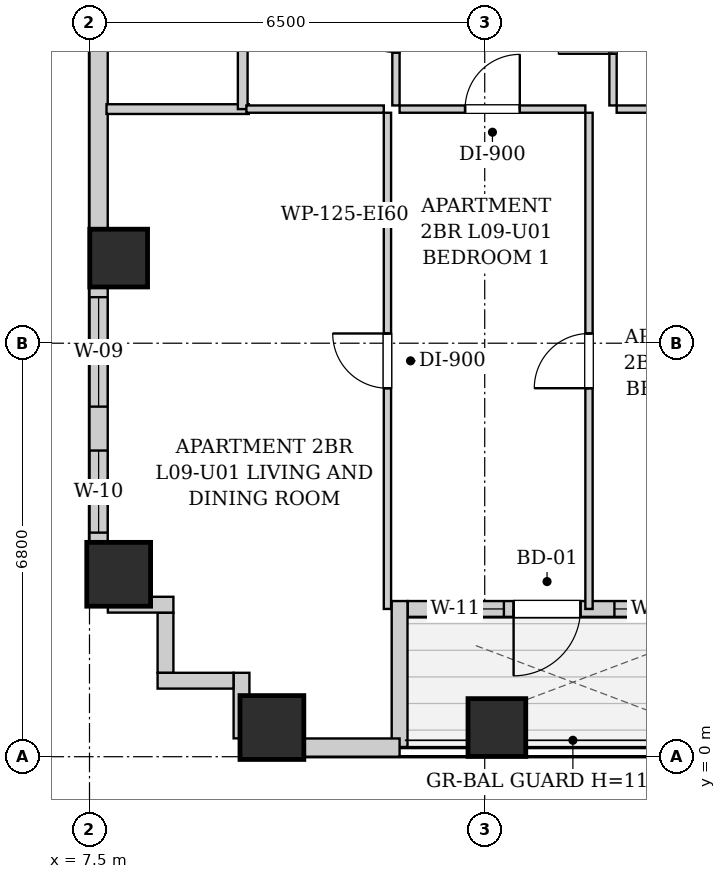
"""IFC4 building model, lengths in metres.
Left out: names, types, materials, properties, quantities, classifications, styles, units other than length and angle.
Written with IfcOpenShell. Run it as: python <this file> out.ifc"""

import sys

from ifc_helpers import new_model, si_unit, direction, frame, frame_2d, origin, origin_2d, place, context, subcontext, project, spatial, rectangle, extrude, element, fill, save


model = new_model("IFC4")
c1 = context("Model", 3, precision=1e-05, world=origin(), true_north=direction((0.0, 1.0)))
c2 = subcontext(c1, "Body", "Model", "MODEL_VIEW")
j1 = project(units=[si_unit("LENGTHUNIT", "METRE"), si_unit("PLANEANGLEUNIT", "RADIAN")], contexts=[c1])
p1 = place(None, origin())
s1 = spatial("IfcSite", under=j1, at=p1, CompositionType="ELEMENT")
p2 = place(p1, origin())
s2 = spatial("IfcBuilding", under=s1, at=p2, CompositionType="ELEMENT")
p3 = place(p2, frame((0.0, 0.0, 38.6)))
s3 = spatial("IfcBuildingStorey", under=s2, at=p3, CompositionType="ELEMENT", Elevation=38.6)
p4 = place(p3, frame((10.5, 0.48, 0.0), z_axis=(0.0, 0.0, 1.0), x_axis=(1.0, 0.0, 0.0)))
e1 = element("IfcColumn", 1, at=p4, inside=s3, PredefinedType="COLUMN", context=c2, shape_type="SweptSolid", body=[
    extrude(rectangle(XDim=1.05, YDim=1.05, at=origin_2d()), origin(), (0.0, 0.0, 1.0), 3.2),
])
p5 = place(p3, frame((14.2, 0.48, 0.0), z_axis=(0.0, 0.0, 1.0), x_axis=(1.0, 0.0, 0.0)))
e2 = element("IfcColumn", 2, at=p5, inside=s3, PredefinedType="COLUMN", context=c2, shape_type="SweptSolid", body=[
    extrude(rectangle(XDim=0.95, YDim=0.95, at=origin_2d()), origin(), (0.0, 0.0, 1.0), 3.2),
])
p6 = place(p3, frame((7.98, 3.0, 0.0), z_axis=(0.0, 0.0, 1.0), x_axis=(1.0, 0.0, 0.0)))
e3 = element("IfcColumn", 3, at=p6, inside=s3, PredefinedType="COLUMN", context=c2, shape_type="SweptSolid", body=[
    extrude(rectangle(XDim=1.05, YDim=1.05, at=origin_2d()), origin(), (0.0, 0.0, 1.0), 3.2),
])
p7 = place(p3, frame((7.98, 8.2, 0.0), z_axis=(0.0, 0.0, 1.0), x_axis=(1.0, 0.0, 0.0)))
e4 = element("IfcColumn", 4, at=p7, inside=s3, PredefinedType="COLUMN", context=c2, shape_type="SweptSolid", body=[
    extrude(rectangle(XDim=0.95, YDim=0.95, at=origin_2d()), origin(), (0.0, 0.0, 1.0), 3.2),
])
p8 = place(p3, frame((18.166, 2.43, 0.0), z_axis=(0.0, 0.0, 1.0), x_axis=(-1.0, 0.0, 0.0)))
e5 = element("IfcWall", 5, at=p8, inside=s3, PredefinedType="SOLIDWALL", context=c2, shape_type="SweptSolid", body=[
    extrude(rectangle(XDim=5.432, YDim=0.26, at=frame_2d((2.716, 0.0))), origin(), (0.0, 0.0, 1.0), 2.94),
])
p9 = place(p8, frame((2.591, 0.0, 0.0)))
e6 = element("IfcOpeningElement", 6, at=p9, cuts=e5, PredefinedType="OPENING", context=c2, shape_type="SweptSolid", body=[
    extrude(rectangle(XDim=1.1, YDim=2.0, at=frame_2d((0.55, 1.0))), frame((0.0, 0.14, 0.0), z_axis=(0.0, -1.0, 0.0), x_axis=(1.0, 0.0, 0.0)), (0.0, 0.0, 1.0), 0.28),
])
p10 = place(p8, frame((3.851, 0.0, 0.55)))
e7 = element("IfcOpeningElement", 7, at=p10, cuts=e5, PredefinedType="OPENING", context=c2, shape_type="SweptSolid", body=[
    extrude(rectangle(XDim=0.85, YDim=1.2, at=frame_2d((0.425, 0.6))), frame((0.0, 0.14, 0.0), z_axis=(0.0, -1.0, 0.0), x_axis=(1.0, 0.0, 0.0)), (0.0, 0.0, 1.0), 0.28),
])
p11 = place(p8, frame((0.683, 0.0, 0.85)))
e8 = element("IfcOpeningElement", 8, at=p11, cuts=e5, PredefinedType="OPENING", context=c2, shape_type="SweptSolid", body=[
    extrude(rectangle(XDim=1.35, YDim=1.65, at=frame_2d((0.675, 0.825))), frame((0.0, 0.14, 0.0), z_axis=(0.0, -1.0, 0.0), x_axis=(1.0, 0.0, 0.0)), (0.0, 0.0, 1.0), 0.28),
])
p12 = place(p3, frame((12.6, 2.56, 0.0), z_axis=(0.0, 0.0, 1.0), x_axis=(0.0, -1.0, 0.0)))
e9 = element("IfcWall", 9, at=p12, inside=s3, PredefinedType="SOLIDWALL", context=c2, shape_type="SweptSolid", body=[
    extrude(rectangle(XDim=2.4, YDim=0.26, at=frame_2d((1.2, 0.0))), origin(), (0.0, 0.0, 1.0), 2.94),
])
p13 = place(p3, frame((12.6, 0.15, 0.0), z_axis=(0.0, 0.0, 1.0), x_axis=(-1.0, 0.0, 0.0)))
e10 = element("IfcWall", 10, at=p13, inside=s3, PredefinedType="SOLIDWALL", context=c2, shape_type="SweptSolid", body=[
    extrude(rectangle(XDim=2.6, YDim=0.3, at=frame_2d((1.3, 0.0))), origin(), (0.0, 0.0, 1.0), 1.975),
])
p14 = place(p3, frame((7.65, 2.5, 0.0), z_axis=(0.0, 0.0, 1.0), x_axis=(0.0, 1.0, 0.0)))
e11 = element("IfcWall", 11, at=p14, inside=s3, PredefinedType="SOLIDWALL", context=c2, shape_type="SweptSolid", body=[
    extrude(rectangle(XDim=12.7, YDim=0.3, at=frame_2d((6.35, 0.0))), origin(), (0.0, 0.0, 1.0), 1.975),
])
p15 = place(p14, frame((3.257, 0.0, 0.55)))
e12 = element("IfcOpeningElement", 12, at=p15, cuts=e11, PredefinedType="OPENING", context=c2, shape_type="SweptSolid", body=[
    extrude(rectangle(XDim=1.8, YDim=1.2, at=frame_2d((0.9, 0.6))), frame((0.0, 0.16, 0.0), z_axis=(0.0, -1.0, 0.0), x_axis=(1.0, 0.0, 0.0)), (0.0, 0.0, 1.0), 0.32),
])
p16 = place(p14, frame((1.185, 0.0, 0.55)))
e13 = element("IfcOpeningElement", 13, at=p16, cuts=e11, PredefinedType="OPENING", context=c2, shape_type="SweptSolid", body=[
    extrude(rectangle(XDim=1.35, YDim=1.2, at=frame_2d((0.675, 0.6))), frame((0.0, 0.16, 0.0), z_axis=(0.0, -1.0, 0.0), x_axis=(1.0, 0.0, 0.0)), (0.0, 0.0, 1.0), 0.32),
])
p17 = place(p3, frame((10.0, 0.302, 0.0), z_axis=(0.0, 0.0, 1.0), x_axis=(0.0, 1.0, 0.0)))
e14 = element("IfcWall", 14, at=p17, inside=s3, PredefinedType="SOLIDWALL", context=c2, shape_type="SweptSolid", body=[
    extrude(rectangle(XDim=1.078, YDim=0.26, at=frame_2d((0.539, 0.0))), origin(), (0.0, 0.0, 1.0), 2.94),
])
p18 = place(p3, frame((9.868, 1.25, 0.0), z_axis=(0.0, 0.0, 1.0), x_axis=(-1.0, 0.0, 0.0)))
e15 = element("IfcWall", 15, at=p18, inside=s3, PredefinedType="SOLIDWALL", context=c2, shape_type="SweptSolid", body=[
    extrude(rectangle(XDim=1.248, YDim=0.26, at=frame_2d((0.624, 0.0))), origin(), (0.0, 0.0, 1.0), 2.94),
])
p19 = place(p3, frame((8.75, 1.382, 0.0), z_axis=(0.0, 0.0, 1.0), x_axis=(0.0, 1.0, 0.0)))
e16 = element("IfcWall", 16, at=p19, inside=s3, PredefinedType="SOLIDWALL", context=c2, shape_type="SweptSolid", body=[
    extrude(rectangle(XDim=0.986, YDim=0.26, at=frame_2d((0.493, 0.0))), origin(), (0.0, 0.0, 1.0), 2.94),
])
p20 = place(p3, frame((8.88, 2.5, 0.0), z_axis=(0.0, 0.0, 1.0), x_axis=(-1.0, 0.0, 0.0)))
e17 = element("IfcWall", 17, at=p20, inside=s3, PredefinedType="SOLIDWALL", context=c2, shape_type="SweptSolid", body=[
    extrude(rectangle(XDim=1.078, YDim=0.26, at=frame_2d((0.539, 0.0))), origin(), (0.0, 0.0, 1.0), 2.94),
])
p21 = place(p3, frame((7.78, 10.65, 0.0), z_axis=(0.0, 0.0, 1.0), x_axis=(1.0, 0.0, 0.0)))
e18 = element("IfcWall", 18, at=p21, inside=s3, PredefinedType="PARTITIONING", context=c2, shape_type="SweptSolid", body=[
    extrude(rectangle(XDim=2.34, YDim=0.16, at=frame_2d((1.17, 0.0))), origin(), (0.0, 0.0, 1.0), 2.94),
])
p22 = place(p3, frame((10.02, 10.65, 0.0), z_axis=(0.0, 0.0, 1.0), x_axis=(0.0, 1.0, 0.0)))
e19 = element("IfcWall", 19, at=p22, inside=s3, PredefinedType="PARTITIONING", context=c2, shape_type="SweptSolid", body=[
    extrude(rectangle(XDim=2.66, YDim=0.16, at=frame_2d((1.33, 0.0))), origin(), (0.0, 0.0, 1.0), 2.94),
])
p23 = place(p3, frame((12.54, 10.71, 0.0), z_axis=(0.0, 0.0, 1.0), x_axis=(0.0, 1.0, 0.0)))
e20 = element("IfcWall", 20, at=p23, inside=s3, PredefinedType="PARTITIONING", context=c2, shape_type="SweptSolid", body=[
    extrude(rectangle(XDim=2.6, YDim=0.12, at=frame_2d((1.3, 0.0))), origin(), (0.0, 0.0, 1.0), 2.94),
])
p24 = place(p23, frame((0.87, 0.0, 0.0)))
e21 = element("IfcOpeningElement", 21, at=p24, cuts=e20, PredefinedType="OPENING", context=c2, shape_type="SweptSolid", body=[
    extrude(rectangle(XDim=0.86, YDim=2.05, at=frame_2d((0.43, 1.025))), frame((0.0, 0.07, 0.0), z_axis=(0.0, -1.0, 0.0), x_axis=(1.0, 0.0, 0.0)), (0.0, 0.0, 1.0), 0.14),
])
p25 = place(p3, frame((10.08, 10.65, 0.0), z_axis=(0.0, 0.0, 1.0), x_axis=(1.0, 0.0, 0.0)))
e22 = element("IfcWall", 22, at=p25, inside=s3, PredefinedType="PARTITIONING", context=c2, shape_type="SweptSolid", body=[
    extrude(rectangle(XDim=2.26, YDim=0.12, at=frame_2d((1.13, 0.0))), origin(), (0.0, 0.0, 1.0), 2.94),
])
p26 = place(p3, frame((16.11, 10.71, 0.0), z_axis=(0.0, 0.0, 1.0), x_axis=(0.0, 1.0, 0.0)))
e23 = element("IfcWall", 23, at=p26, inside=s3, PredefinedType="PARTITIONING", context=c2, shape_type="SweptSolid", body=[
    extrude(rectangle(XDim=2.6, YDim=0.12, at=frame_2d((1.3, 0.0))), origin(), (0.0, 0.0, 1.0), 2.94),
])
p27 = place(p26, frame((0.85, 0.0, 0.0)))
e24 = element("IfcOpeningElement", 24, at=p27, cuts=e23, PredefinedType="OPENING", context=c2, shape_type="SweptSolid", body=[
    extrude(rectangle(XDim=0.9, YDim=2.05, at=frame_2d((0.45, 1.025))), frame((0.0, 0.07, 0.0), z_axis=(0.0, -1.0, 0.0), x_axis=(1.0, 0.0, 0.0)), (0.0, 0.0, 1.0), 0.14),
])
p28 = place(p3, frame((12.6, 10.65, 0.0), z_axis=(0.0, 0.0, 1.0), x_axis=(1.0, 0.0, 0.0)))
e25 = element("IfcWall", 25, at=p28, inside=s3, PredefinedType="PARTITIONING", context=c2, shape_type="SweptSolid", body=[
    extrude(rectangle(XDim=3.055, YDim=0.12, at=frame_2d((1.527, 0.0))), origin(), (0.0, 0.0, 1.0), 2.94),
])
p29 = place(p28, frame((1.077, 0.0, 0.0)))
e26 = element("IfcOpeningElement", 26, at=p29, cuts=e25, PredefinedType="OPENING", context=c2, shape_type="SweptSolid", body=[
    extrude(rectangle(XDim=0.9, YDim=2.05, at=frame_2d((0.45, 1.025))), frame((0.0, 0.07, 0.0), z_axis=(0.0, -1.0, 0.0), x_axis=(1.0, 0.0, 0.0)), (0.0, 0.0, 1.0), 0.14),
])
p30 = place(p3, frame((16.17, 10.65, 0.0), z_axis=(0.0, 0.0, 1.0), x_axis=(1.0, 0.0, 0.0)))
e27 = element("IfcWall", 27, at=p30, inside=s3, PredefinedType="PARTITIONING", context=c2, shape_type="SweptSolid", body=[
    extrude(rectangle(XDim=2.8, YDim=0.12, at=frame_2d((1.4, 0.0))), origin(), (0.0, 0.0, 1.0), 2.94),
])
p31 = place(p30, frame((0.95, 0.0, 0.0)))
e28 = element("IfcOpeningElement", 28, at=p31, cuts=e27, PredefinedType="OPENING", context=c2, shape_type="SweptSolid", body=[
    extrude(rectangle(XDim=0.9, YDim=2.05, at=frame_2d((0.45, 1.025))), frame((0.0, 0.07, 0.0), z_axis=(0.0, -1.0, 0.0), x_axis=(1.0, 0.0, 0.0)), (0.0, 0.0, 1.0), 0.14),
])
p32 = place(p3, frame((12.4, 2.43, 0.0), z_axis=(0.0, 0.0, 1.0), x_axis=(0.0, 1.0, 0.0)))
e29 = element("IfcWall", 29, at=p32, inside=s3, PredefinedType="PARTITIONING", context=c2, shape_type="SweptSolid", body=[
    extrude(rectangle(XDim=8.16, YDim=0.12, at=frame_2d((4.08, 0.0))), origin(), (0.0, 0.0, 1.0), 2.94),
])
p33 = place(p32, frame((3.63, 0.0, 0.0)))
e30 = element("IfcOpeningElement", 30, at=p33, cuts=e29, PredefinedType="OPENING", context=c2, shape_type="SweptSolid", body=[
    extrude(rectangle(XDim=0.9, YDim=2.05, at=frame_2d((0.45, 1.025))), frame((0.0, 0.07, 0.0), z_axis=(0.0, -1.0, 0.0), x_axis=(1.0, 0.0, 0.0)), (0.0, 0.0, 1.0), 0.14),
])
p34 = place(p3, frame((15.715, 2.43, 0.0), z_axis=(0.0, 0.0, 1.0), x_axis=(0.0, 1.0, 0.0)))
e31 = element("IfcWall", 31, at=p34, inside=s3, PredefinedType="PARTITIONING", context=c2, shape_type="SweptSolid", body=[
    extrude(rectangle(XDim=8.16, YDim=0.12, at=frame_2d((4.08, 0.0))), origin(), (0.0, 0.0, 1.0), 2.94),
])
p35 = place(p34, frame((3.63, 0.0, 0.0)))
e32 = element("IfcOpeningElement", 32, at=p35, cuts=e31, PredefinedType="OPENING", context=c2, shape_type="SweptSolid", body=[
    extrude(rectangle(XDim=0.9, YDim=2.05, at=frame_2d((0.45, 1.025))), frame((0.0, 0.07, 0.0), z_axis=(0.0, -1.0, 0.0), x_axis=(1.0, 0.0, 0.0)), (0.0, 0.0, 1.0), 0.14),
])
p36 = place(p24, origin())
e33 = element("IfcDoor", 33, at=p36, inside=s3, OperationType="SINGLE_SWING_RIGHT", PredefinedType="DOOR", context=c2, shape_type="SweptSolid", body=[
    extrude(rectangle(XDim=0.86, YDim=2.05, at=frame_2d((0.43, 1.025))), frame((0.0, 0.025, 0.0), z_axis=(0.0, -1.0, 0.0), x_axis=(1.0, 0.0, 0.0)), (0.0, 0.0, 1.0), 0.05),
])
fill(e21, e33)
p37 = place(p27, origin())
e34 = element("IfcDoor", 34, at=p37, inside=s3, OperationType="SINGLE_SWING_LEFT", PredefinedType="DOOR", context=c2, shape_type="SweptSolid", body=[
    extrude(rectangle(XDim=0.9, YDim=2.05, at=frame_2d((0.45, 1.025))), frame((0.0, 0.025, 0.0), z_axis=(0.0, -1.0, 0.0), x_axis=(1.0, 0.0, 0.0)), (0.0, 0.0, 1.0), 0.05),
])
fill(e24, e34)
p38 = place(p29, origin())
e35 = element("IfcDoor", 35, at=p38, inside=s3, OperationType="SINGLE_SWING_RIGHT", PredefinedType="DOOR", context=c2, shape_type="SweptSolid", body=[
    extrude(rectangle(XDim=0.9, YDim=2.05, at=frame_2d((0.45, 1.025))), frame((0.0, 0.025, 0.0), z_axis=(0.0, -1.0, 0.0), x_axis=(1.0, 0.0, 0.0)), (0.0, 0.0, 1.0), 0.05),
])
fill(e26, e35)
p39 = place(p33, origin())
e36 = element("IfcDoor", 36, at=p39, inside=s3, OperationType="SINGLE_SWING_RIGHT", PredefinedType="DOOR", context=c2, shape_type="SweptSolid", body=[
    extrude(rectangle(XDim=0.9, YDim=2.05, at=frame_2d((0.45, 1.025))), frame((0.0, 0.025, 0.0), z_axis=(0.0, -1.0, 0.0), x_axis=(1.0, 0.0, 0.0)), (0.0, 0.0, 1.0), 0.05),
])
fill(e30, e36)
p40 = place(p35, origin())
e37 = element("IfcDoor", 37, at=p40, inside=s3, OperationType="SINGLE_SWING_LEFT", PredefinedType="DOOR", context=c2, shape_type="SweptSolid", body=[
    extrude(rectangle(XDim=0.9, YDim=2.05, at=frame_2d((0.45, 1.025))), frame((0.0, 0.025, 0.0), z_axis=(0.0, -1.0, 0.0), x_axis=(1.0, 0.0, 0.0)), (0.0, 0.0, 1.0), 0.05),
])
fill(e32, e37)
p41 = place(p9, origin())
e38 = element("IfcDoor", 38, at=p41, inside=s3, OperationType="SINGLE_SWING_RIGHT", PredefinedType="DOOR", context=c2, shape_type="SweptSolid", body=[
    extrude(rectangle(XDim=1.1, YDim=2.0, at=frame_2d((0.55, 1.0))), frame((0.0, 0.025, 0.0), z_axis=(0.0, -1.0, 0.0), x_axis=(1.0, 0.0, 0.0)), (0.0, 0.0, 1.0), 0.05),
])
fill(e6, e38)
p42 = place(p15, origin())
e39 = element("IfcWindow", 39, at=p42, inside=s3, PartitioningType="DOUBLE_PANEL_VERTICAL", PredefinedType="WINDOW", context=c2, shape_type="SweptSolid", body=[
    extrude(rectangle(XDim=1.8, YDim=1.2, at=frame_2d((0.9, 0.6))), frame((0.0, 0.03, 0.0), z_axis=(0.0, -1.0, 0.0), x_axis=(1.0, 0.0, 0.0)), (0.0, 0.0, 1.0), 0.06),
])
fill(e12, e39)
p43 = place(p16, origin())
e40 = element("IfcWindow", 40, at=p43, inside=s3, PartitioningType="SINGLE_PANEL", PredefinedType="WINDOW", context=c2, shape_type="SweptSolid", body=[
    extrude(rectangle(XDim=1.35, YDim=1.2, at=frame_2d((0.675, 0.6))), frame((0.0, 0.03, 0.0), z_axis=(0.0, -1.0, 0.0), x_axis=(1.0, 0.0, 0.0)), (0.0, 0.0, 1.0), 0.06),
])
fill(e13, e40)
p44 = place(p10, origin())
e41 = element("IfcWindow", 41, at=p44, inside=s3, PartitioningType="SINGLE_PANEL", PredefinedType="WINDOW", context=c2, shape_type="SweptSolid", body=[
    extrude(rectangle(XDim=0.85, YDim=1.2, at=frame_2d((0.425, 0.6))), frame((0.0, 0.03, 0.0), z_axis=(0.0, -1.0, 0.0), x_axis=(1.0, 0.0, 0.0)), (0.0, 0.0, 1.0), 0.06),
])
fill(e7, e41)
p45 = place(p11, origin())
e42 = element("IfcWindow", 42, at=p45, inside=s3, PartitioningType="SINGLE_PANEL", PredefinedType="WINDOW", context=c2, shape_type="SweptSolid", body=[
    extrude(rectangle(XDim=1.35, YDim=1.65, at=frame_2d((0.675, 0.825))), frame((0.0, 0.03, 0.0), z_axis=(0.0, -1.0, 0.0), x_axis=(1.0, 0.0, 0.0)), (0.0, 0.0, 1.0), 0.06),
])
fill(e8, e42)
save(model, sys.argv[1])
